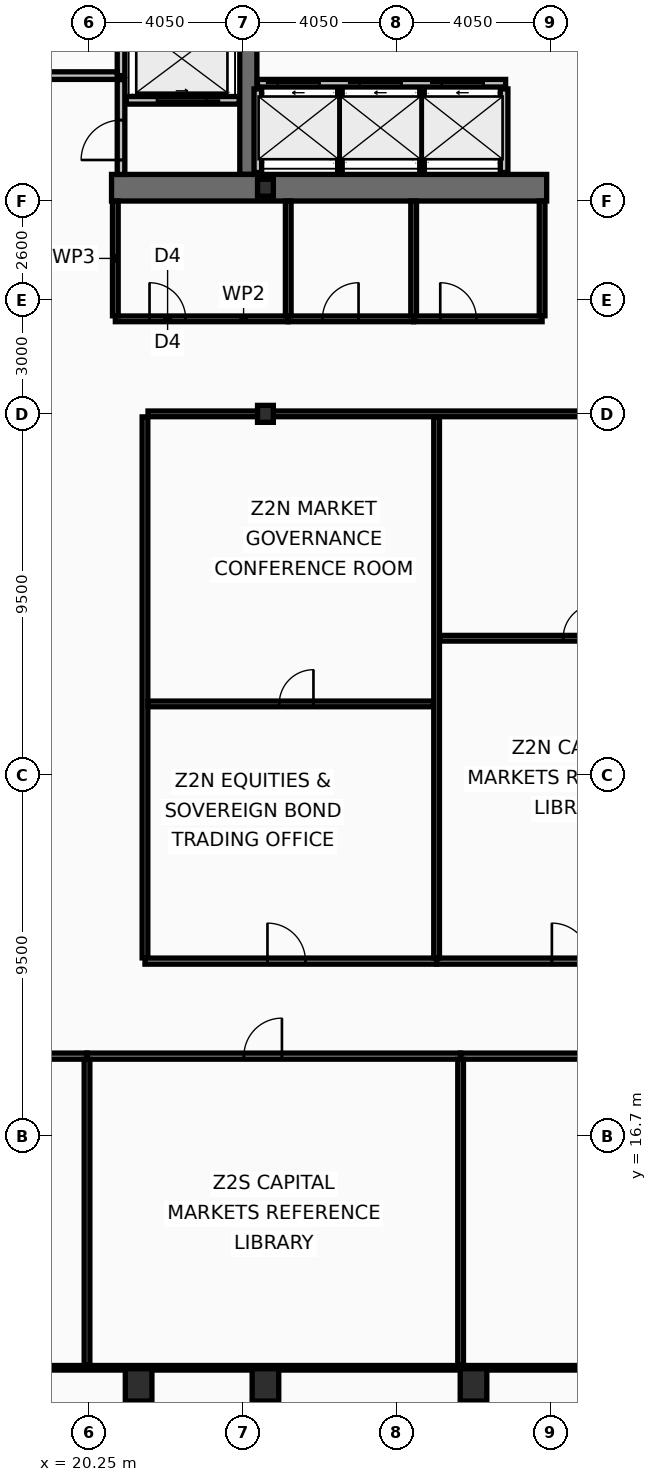
"""IFC4 building model, lengths in metres.
Left out: names, types, materials, properties, quantities, classifications, styles, units other than length and angle.
Written with IfcOpenShell. Run it as: python <this file> out.ifc"""

import sys

from ifc_helpers import new_model, si_unit, direction, frame, frame_2d, origin, origin_2d, place, context, subcontext, project, spatial, rectangle, hollow_rectangle, i_section, extrude, element, fill, save


model = new_model("IFC4")
c1 = context("Model", 3, precision=1e-05, world=origin(), true_north=direction((0.0, 1.0)))
c2 = subcontext(c1, "Body", "Model", "MODEL_VIEW")
j1 = project(units=[si_unit("LENGTHUNIT", "METRE"), si_unit("PLANEANGLEUNIT", "RADIAN")], contexts=[c1])
p1 = place(None, origin())
s1 = spatial("IfcSite", under=j1, at=p1, CompositionType="ELEMENT")
p2 = place(p1, origin())
s2 = spatial("IfcBuilding", under=s1, at=p2, CompositionType="ELEMENT")
p3 = place(p2, frame((0.0, 0.0, 147.0)))
s3 = spatial("IfcBuildingStorey", under=s2, at=p3, CompositionType="ELEMENT", Elevation=147.0)
p4 = place(p3, frame((24.45, 42.0, 0.0), z_axis=(0.0, 0.0, 1.0), x_axis=(0.0, 1.0, 0.0)))
e1 = element("IfcWall", 1, at=p4, inside=s3, PredefinedType="SHEAR", context=c2, shape_type="SweptSolid", body=[
    extrude(rectangle(XDim=11.0, YDim=0.45, at=frame_2d((5.5, 0.0))), origin(), (0.0, 0.0, 1.0), 3.44),
])
p5 = place(p3, frame((32.3, 41.65, 0.0), z_axis=(0.0, 0.0, 1.0), x_axis=(-1.0, 0.0, 0.0)))
e2 = element("IfcWall", 2, at=p5, inside=s3, PredefinedType="SHEAR", context=c2, shape_type="SweptSolid", body=[
    extrude(rectangle(XDim=11.45, YDim=0.7, at=frame_2d((5.725, 0.0))), origin(), (0.0, 0.0, 1.0), 3.44),
])
for number, where, z_axis, x_axis in (
    (3, (21.562, 10.15, 0.0), (0.0, 0.0, 1.0), (1.0, 0.0, 0.0)),
    (4, (24.9, 10.15, 0.0), (0.0, 0.0, 1.0), (1.0, 0.0, 0.0)),
    (5, (30.375, 10.15, 0.0), (0.0, 0.0, 1.0), (1.0, 0.0, 0.0)),
):
    element("IfcColumn", number, at=place(p3, frame(where, z_axis=z_axis, x_axis=x_axis)), inside=s3, PredefinedType="COLUMN", context=c2, shape_type="SweptSolid", body=[
        extrude(hollow_rectangle(XDim=0.7, YDim=0.85, WallThickness=0.05, at=origin_2d()), origin(), (0.0, 0.0, 1.0), 3.6),
    ])
for number, where, z_axis, x_axis in (
    (6, (24.9, 35.7, 0.0), (0.0, 0.0, 1.0), (1.0, 0.0, 0.0)),
    (7, (24.9, 41.65, 0.0), (0.0, 0.0, 1.0), (1.0, 0.0, 0.0)),
):
    element("IfcColumn", number, at=place(p3, frame(where, z_axis=z_axis, x_axis=x_axis)), inside=s3, PredefinedType="COLUMN", context=c2, shape_type="SweptSolid", body=[
        extrude(i_section(OverallWidth=0.416, OverallDepth=0.446, WebThickness=0.039, FlangeThickness=0.063, at=origin_2d()), origin(), (0.0, 0.0, 1.0), 3.6),
    ])
p6 = place(p3, frame((24.69, 44.4, 0.0), z_axis=(0.0, 0.0, 1.0), x_axis=(1.0, 0.0, 0.0)))
e8 = element("IfcWall", 8, at=p6, inside=s3, PredefinedType="PARTITIONING", context=c2, shape_type="SweptSolid", body=[
    extrude(rectangle(XDim=6.53, YDim=0.2, at=frame_2d((3.265, 0.0))), origin(), (0.0, 0.0, 1.0), 3.44),
])
p7 = place(p6, frame((0.53, 0.0, 0.0)))
e9 = element("IfcOpeningElement", 9, at=p7, cuts=e8, PredefinedType="OPENING", context=c2, shape_type="SweptSolid", body=[
    extrude(rectangle(XDim=1.1, YDim=2.18, at=frame_2d((0.55, 1.09))), frame((0.0, 0.11, 0.0), z_axis=(0.0, -1.0, 0.0), x_axis=(1.0, 0.0, 0.0)), (0.0, 0.0, 1.0), 0.22),
])
p8 = place(p6, frame((2.69, 0.0, 0.0)))
e10 = element("IfcOpeningElement", 10, at=p8, cuts=e8, PredefinedType="OPENING", context=c2, shape_type="SweptSolid", body=[
    extrude(rectangle(XDim=1.1, YDim=2.18, at=frame_2d((0.55, 1.09))), frame((0.0, 0.11, 0.0), z_axis=(0.0, -1.0, 0.0), x_axis=(1.0, 0.0, 0.0)), (0.0, 0.0, 1.0), 0.22),
])
p9 = place(p6, frame((4.85, 0.0, 0.0)))
e11 = element("IfcOpeningElement", 11, at=p9, cuts=e8, PredefinedType="OPENING", context=c2, shape_type="SweptSolid", body=[
    extrude(rectangle(XDim=1.1, YDim=2.18, at=frame_2d((0.55, 1.09))), frame((0.0, 0.11, 0.0), z_axis=(0.0, -1.0, 0.0), x_axis=(1.0, 0.0, 0.0)), (0.0, 0.0, 1.0), 0.22),
])
p10 = place(p3, frame((24.21, 43.95, 0.0), z_axis=(0.0, 0.0, 1.0), x_axis=(-1.0, 0.0, 0.0)))
e12 = element("IfcWall", 12, at=p10, inside=s3, PredefinedType="PARTITIONING", context=c2, shape_type="SweptSolid", body=[
    extrude(rectangle(XDim=2.97, YDim=0.2, at=frame_2d((1.485, 0.0))), origin(), (0.0, 0.0, 1.0), 3.44),
])
p11 = place(p10, frame((0.86, 0.0, 0.0)))
e13 = element("IfcOpeningElement", 13, at=p11, cuts=e12, PredefinedType="OPENING", context=c2, shape_type="SweptSolid", body=[
    extrude(rectangle(XDim=1.3, YDim=2.18, at=frame_2d((0.65, 1.09))), frame((0.0, 0.11, 0.0), z_axis=(0.0, -1.0, 0.0), x_axis=(1.0, 0.0, 0.0)), (0.0, 0.0, 1.0), 0.22),
])
p12 = place(p3, frame((21.1, 44.6, 0.0), z_axis=(0.0, 0.0, 1.0), x_axis=(0.0, 1.0, 0.0)))
e14 = element("IfcWall", 14, at=p12, inside=s3, PredefinedType="PARTITIONING", context=c2, shape_type="SweptSolid", body=[
    extrude(rectangle(XDim=4.3, YDim=0.2, at=frame_2d((2.15, 0.0))), origin(), (0.0, 0.0, 1.0), 3.44),
])
p13 = place(p3, frame((16.9, 44.6, 0.0), z_axis=(0.0, 0.0, 1.0), x_axis=(1.0, 0.0, 0.0)))
e15 = element("IfcWall", 15, at=p13, inside=s3, PredefinedType="PARTITIONING", context=c2, shape_type="SweptSolid", body=[
    extrude(rectangle(XDim=4.1, YDim=0.2, at=frame_2d((2.05, 0.0))), origin(), (0.0, 0.0, 1.0), 3.44),
])
p14 = place(p13, frame((1.25, 0.0, 0.0)))
e16 = element("IfcOpeningElement", 16, at=p14, cuts=e15, PredefinedType="OPENING", context=c2, shape_type="SweptSolid", body=[
    extrude(rectangle(XDim=1.05, YDim=2.15, at=frame_2d((0.525, 1.075))), frame((0.0, 0.11, 0.0), z_axis=(0.0, -1.0, 0.0), x_axis=(1.0, 0.0, 0.0)), (0.0, 0.0, 1.0), 0.22),
])
p15 = place(p3, frame((21.1, 42.0, 0.0), z_axis=(0.0, 0.0, 1.0), x_axis=(0.0, 1.0, 0.0)))
e17 = element("IfcWall", 17, at=p15, inside=s3, PredefinedType="PARTITIONING", context=c2, shape_type="SweptSolid", body=[
    extrude(rectangle(XDim=2.495, YDim=0.2, at=frame_2d((1.248, 0.0))), origin(), (0.0, 0.0, 1.0), 3.44),
])
p16 = place(p15, frame((0.38, 0.0, 0.0)))
e18 = element("IfcOpeningElement", 18, at=p16, cuts=e17, PredefinedType="OPENING", context=c2, shape_type="SweptSolid", body=[
    extrude(rectangle(XDim=1.05, YDim=2.15, at=frame_2d((0.525, 1.075))), frame((0.0, 0.11, 0.0), z_axis=(0.0, -1.0, 0.0), x_axis=(1.0, 0.0, 0.0)), (0.0, 0.0, 1.0), 0.22),
])
for number, where, z_axis, x_axis in (
    (19, (24.7, 42.05, 0.0), (0.0, 0.0, 1.0), (0.0, 1.0, 0.0)),
    (20, (31.18, 42.05, 0.0), (0.0, 0.0, 1.0), (0.0, 1.0, 0.0)),
):
    element("IfcWall", number, at=place(p3, frame(where, z_axis=z_axis, x_axis=x_axis)), inside=s3, PredefinedType="PARTITIONING", context=c2, shape_type="SweptSolid", body=[
        extrude(rectangle(XDim=2.2, YDim=0.2, at=frame_2d((1.1, 0.0))), origin(), (0.0, 0.0, 1.0), 3.44),
    ])
for number, where, z_axis, x_axis in (
    (21, (26.86, 42.05, 0.0), (0.0, 0.0, 1.0), (0.0, 1.0, 0.0)),
    (22, (29.02, 42.05, 0.0), (0.0, 0.0, 1.0), (0.0, 1.0, 0.0)),
):
    element("IfcWall", number, at=place(p3, frame(where, z_axis=z_axis, x_axis=x_axis)), inside=s3, PredefinedType="PARTITIONING", context=c2, shape_type="SweptSolid", body=[
        extrude(rectangle(XDim=2.2, YDim=0.12, at=frame_2d((1.1, 0.0))), origin(), (0.0, 0.0, 1.0), 3.44),
    ])
p17 = place(p3, frame((20.95, 38.2, 0.0), z_axis=(0.0, 0.0, 1.0), x_axis=(1.0, 0.0, 0.0)))
e23 = element("IfcWall", 23, at=p17, inside=s3, PredefinedType="PARTITIONING", context=c2, shape_type="SweptSolid", body=[
    extrude(rectangle(XDim=4.55, YDim=0.15, at=frame_2d((2.275, 0.0))), origin(), (0.0, 0.0, 1.0), 2.73),
])
p18 = place(p17, frame((0.9, 0.0, 0.0)))
e24 = element("IfcOpeningElement", 24, at=p18, cuts=e23, PredefinedType="OPENING", context=c2, shape_type="SweptSolid", body=[
    extrude(rectangle(XDim=0.95, YDim=2.05, at=frame_2d((0.475, 1.025))), frame((0.0, 0.085, 0.0), z_axis=(0.0, -1.0, 0.0), x_axis=(1.0, 0.0, 0.0)), (0.0, 0.0, 1.0), 0.17),
])
p19 = place(p3, frame((25.5, 38.2, 0.0), z_axis=(0.0, 0.0, 1.0), x_axis=(1.0, 0.0, 0.0)))
e25 = element("IfcWall", 25, at=p19, inside=s3, PredefinedType="PARTITIONING", context=c2, shape_type="SweptSolid", body=[
    extrude(rectangle(XDim=3.3, YDim=0.15, at=frame_2d((1.65, 0.0))), origin(), (0.0, 0.0, 1.0), 3.44),
])
p20 = place(p19, frame((0.9, 0.0, 0.0)))
e26 = element("IfcOpeningElement", 26, at=p20, cuts=e25, PredefinedType="OPENING", context=c2, shape_type="SweptSolid", body=[
    extrude(rectangle(XDim=0.95, YDim=2.05, at=frame_2d((0.475, 1.025))), frame((0.0, 0.085, 0.0), z_axis=(0.0, -1.0, 0.0), x_axis=(1.0, 0.0, 0.0)), (0.0, 0.0, 1.0), 0.17),
])
p21 = place(p3, frame((28.8, 38.2, 0.0), z_axis=(0.0, 0.0, 1.0), x_axis=(1.0, 0.0, 0.0)))
e27 = element("IfcWall", 27, at=p21, inside=s3, PredefinedType="PARTITIONING", context=c2, shape_type="SweptSolid", body=[
    extrude(rectangle(XDim=3.38, YDim=0.15, at=frame_2d((1.69, 0.0))), origin(), (0.0, 0.0, 1.0), 2.73),
])
p22 = place(p21, frame((0.7, 0.0, 0.0)))
e28 = element("IfcOpeningElement", 28, at=p22, cuts=e27, PredefinedType="OPENING", context=c2, shape_type="SweptSolid", body=[
    extrude(rectangle(XDim=0.95, YDim=2.05, at=frame_2d((0.475, 1.025))), frame((0.0, 0.085, 0.0), z_axis=(0.0, -1.0, 0.0), x_axis=(1.0, 0.0, 0.0)), (0.0, 0.0, 1.0), 0.17),
])
for number, where, z_axis, x_axis in (
    (29, (20.95, 38.28, 0.0), (0.0, 0.0, 1.0), (0.0, 1.0, 0.0)),
    (30, (25.5, 38.28, 0.0), (0.0, 0.0, 1.0), (0.0, 1.0, 0.0)),
    (31, (28.8, 38.28, 0.0), (0.0, 0.0, 1.0), (0.0, 1.0, 0.0)),
    (32, (32.18, 38.28, 0.0), (0.0, 0.0, 1.0), (0.0, 1.0, 0.0)),
):
    element("IfcWall", number, at=place(p3, frame(where, z_axis=z_axis, x_axis=x_axis)), inside=s3, PredefinedType="PARTITIONING", context=c2, shape_type="SweptSolid", body=[
        extrude(rectangle(XDim=3.02, YDim=0.15, at=frame_2d((1.51, 0.0))), origin(), (0.0, 0.0, 1.0), 3.44),
    ])
p23 = place(p3, frame((6.03, 18.8, 0.0), z_axis=(0.0, 0.0, 1.0), x_axis=(1.0, 0.0, 0.0)))
e33 = element("IfcWall", 33, at=p23, inside=s3, PredefinedType="PARTITIONING", context=c2, shape_type="SweptSolid", body=[
    extrude(rectangle(XDim=14.175, YDim=0.16, at=frame_2d((7.087, 0.0))), origin(), (0.0, 0.0, 1.0), 2.73),
])
p24 = place(p23, frame((5.953, 0.0, 0.0)))
e34 = element("IfcOpeningElement", 34, at=p24, cuts=e33, PredefinedType="OPENING", context=c2, shape_type="SweptSolid", body=[
    extrude(rectangle(XDim=1.6, YDim=2.15, at=frame_2d((0.8, 1.075))), frame((0.0, 0.09, 0.0), z_axis=(0.0, -1.0, 0.0), x_axis=(1.0, 0.0, 0.0)), (0.0, 0.0, 1.0), 0.18),
])
p25 = place(p3, frame((20.205, 18.8, 0.0), z_axis=(0.0, 0.0, 1.0), x_axis=(1.0, 0.0, 0.0)))
e35 = element("IfcWall", 35, at=p25, inside=s3, PredefinedType="PARTITIONING", context=c2, shape_type="SweptSolid", body=[
    extrude(rectangle(XDim=9.831, YDim=0.16, at=frame_2d((4.916, 0.0))), origin(), (0.0, 0.0, 1.0), 2.73),
])
p26 = place(p25, frame((4.129, 0.0, 0.0)))
e36 = element("IfcOpeningElement", 36, at=p26, cuts=e35, PredefinedType="OPENING", context=c2, shape_type="SweptSolid", body=[
    extrude(rectangle(XDim=1.0, YDim=2.05, at=frame_2d((0.5, 1.025))), frame((0.0, 0.09, 0.0), z_axis=(0.0, -1.0, 0.0), x_axis=(1.0, 0.0, 0.0)), (0.0, 0.0, 1.0), 0.18),
])
p27 = place(p3, frame((20.205, 10.665, 0.0), z_axis=(0.0, 0.0, 1.0), x_axis=(0.0, 1.0, 0.0)))
e37 = element("IfcWall", 37, at=p27, inside=s3, PredefinedType="PARTITIONING", context=c2, shape_type="SweptSolid", body=[
    extrude(rectangle(XDim=8.05, YDim=0.15, at=frame_2d((4.025, 0.0))), origin(), (0.0, 0.0, 1.0), 2.93),
])
p28 = place(p3, frame((30.036, 18.8, 0.0), z_axis=(0.0, 0.0, 1.0), x_axis=(1.0, 0.0, 0.0)))
e38 = element("IfcWall", 38, at=p28, inside=s3, PredefinedType="PARTITIONING", context=c2, shape_type="SweptSolid", body=[
    extrude(rectangle(XDim=10.796, YDim=0.16, at=frame_2d((5.398, 0.0))), origin(), (0.0, 0.0, 1.0), 2.73),
])
p29 = place(p28, frame((4.534, 0.0, 0.0)))
e39 = element("IfcOpeningElement", 39, at=p29, cuts=e38, PredefinedType="OPENING", context=c2, shape_type="SweptSolid", body=[
    extrude(rectangle(XDim=1.0, YDim=2.05, at=frame_2d((0.5, 1.025))), frame((0.0, 0.09, 0.0), z_axis=(0.0, -1.0, 0.0), x_axis=(1.0, 0.0, 0.0)), (0.0, 0.0, 1.0), 0.18),
])
p30 = place(p3, frame((30.036, 10.665, 0.0), z_axis=(0.0, 0.0, 1.0), x_axis=(0.0, 1.0, 0.0)))
e40 = element("IfcWall", 40, at=p30, inside=s3, PredefinedType="PARTITIONING", context=c2, shape_type="SweptSolid", body=[
    extrude(rectangle(XDim=8.05, YDim=0.15, at=frame_2d((4.025, 0.0))), origin(), (0.0, 0.0, 1.0), 2.73),
])
p31 = place(p3, frame((21.73, 21.385, 0.0), z_axis=(0.0, 0.0, 1.0), x_axis=(0.0, 1.0, 0.0)))
e41 = element("IfcWall", 41, at=p31, inside=s3, PredefinedType="PARTITIONING", context=c2, shape_type="SweptSolid", body=[
    extrude(rectangle(XDim=14.235, YDim=0.15, at=frame_2d((7.118, 0.0))), origin(), (0.0, 0.0, 1.0), 2.93),
])
p32 = place(p3, frame((21.81, 35.7, 0.0), z_axis=(0.0, 0.0, 1.0), x_axis=(1.0, 0.0, 0.0)))
e42 = element("IfcWall", 42, at=p32, inside=s3, PredefinedType="PARTITIONING", context=c2, shape_type="SweptSolid", body=[
    extrude(rectangle(XDim=44.995, YDim=0.15, at=frame_2d((22.498, 0.0))), origin(), (0.0, 0.0, 1.0), 2.73),
])
p33 = place(p3, frame((21.73, 21.3, 0.0), z_axis=(0.0, 0.0, 1.0), x_axis=(1.0, 0.0, 0.0)))
e43 = element("IfcWall", 43, at=p33, inside=s3, PredefinedType="PARTITIONING", context=c2, shape_type="SweptSolid", body=[
    extrude(rectangle(XDim=7.674, YDim=0.16, at=frame_2d((3.837, 0.0))), origin(), (0.0, 0.0, 1.0), 2.73),
])
p34 = place(p33, frame((3.223, 0.0, 0.0)))
e44 = element("IfcOpeningElement", 44, at=p34, cuts=e43, PredefinedType="OPENING", context=c2, shape_type="SweptSolid", body=[
    extrude(rectangle(XDim=1.0, YDim=2.05, at=frame_2d((0.5, 1.025))), frame((0.0, 0.09, 0.0), z_axis=(0.0, -1.0, 0.0), x_axis=(1.0, 0.0, 0.0)), (0.0, 0.0, 1.0), 0.18),
])
p35 = place(p3, frame((21.81, 28.068, 0.0), z_axis=(0.0, 0.0, 1.0), x_axis=(1.0, 0.0, 0.0)))
e45 = element("IfcWall", 45, at=p35, inside=s3, PredefinedType="PARTITIONING", context=c2, shape_type="SweptSolid", body=[
    extrude(rectangle(XDim=7.514, YDim=0.15, at=frame_2d((3.757, 0.0))), origin(), (0.0, 0.0, 1.0), 2.73),
])
p36 = place(p35, frame((3.453, 0.0, 0.0)))
e46 = element("IfcOpeningElement", 46, at=p36, cuts=e45, PredefinedType="OPENING", context=c2, shape_type="SweptSolid", body=[
    extrude(rectangle(XDim=0.9, YDim=2.05, at=frame_2d((0.45, 1.025))), frame((0.0, 0.085, 0.0), z_axis=(0.0, -1.0, 0.0), x_axis=(1.0, 0.0, 0.0)), (0.0, 0.0, 1.0), 0.17),
])
p37 = place(p3, frame((29.404, 21.3, 0.0), z_axis=(0.0, 0.0, 1.0), x_axis=(1.0, 0.0, 0.0)))
e47 = element("IfcWall", 47, at=p37, inside=s3, PredefinedType="PARTITIONING", context=c2, shape_type="SweptSolid", body=[
    extrude(rectangle(XDim=7.222, YDim=0.16, at=frame_2d((3.611, 0.0))), origin(), (0.0, 0.0, 1.0), 2.73),
])
p38 = place(p37, frame((3.033, 0.0, 0.0)))
e48 = element("IfcOpeningElement", 48, at=p38, cuts=e47, PredefinedType="OPENING", context=c2, shape_type="SweptSolid", body=[
    extrude(rectangle(XDim=1.0, YDim=2.05, at=frame_2d((0.5, 1.025))), frame((0.0, 0.09, 0.0), z_axis=(0.0, -1.0, 0.0), x_axis=(1.0, 0.0, 0.0)), (0.0, 0.0, 1.0), 0.18),
])
p39 = place(p3, frame((29.404, 21.385, 0.0), z_axis=(0.0, 0.0, 1.0), x_axis=(0.0, 1.0, 0.0)))
e49 = element("IfcWall", 49, at=p39, inside=s3, PredefinedType="PARTITIONING", context=c2, shape_type="SweptSolid", body=[
    extrude(rectangle(XDim=14.235, YDim=0.15, at=frame_2d((7.118, 0.0))), origin(), (0.0, 0.0, 1.0), 2.93),
])
p40 = place(p3, frame((29.484, 29.796, 0.0), z_axis=(0.0, 0.0, 1.0), x_axis=(1.0, 0.0, 0.0)))
e50 = element("IfcWall", 50, at=p40, inside=s3, PredefinedType="PARTITIONING", context=c2, shape_type="SweptSolid", body=[
    extrude(rectangle(XDim=7.062, YDim=0.15, at=frame_2d((3.531, 0.0))), origin(), (0.0, 0.0, 1.0), 2.73),
])
p41 = place(p40, frame((3.25, 0.0, 0.0)))
e51 = element("IfcOpeningElement", 51, at=p41, cuts=e50, PredefinedType="OPENING", context=c2, shape_type="SweptSolid", body=[
    extrude(rectangle(XDim=0.9, YDim=2.05, at=frame_2d((0.45, 1.025))), frame((0.0, 0.085, 0.0), z_axis=(0.0, -1.0, 0.0), x_axis=(1.0, 0.0, 0.0)), (0.0, 0.0, 1.0), 0.17),
])
p42 = place(p3, frame((6.095, 10.6, 0.0), z_axis=(0.0, 0.0, 1.0), x_axis=(1.0, 0.0, 0.0)))
e52 = element("IfcWall", 52, at=p42, inside=s3, PredefinedType="PARTITIONING", context=c2, shape_type="SweptSolid", body=[
    extrude(rectangle(XDim=60.71, YDim=0.12, at=frame_2d((30.355, 0.0))), origin(), (0.0, 0.0, 1.0), 2.73),
])
p43 = place(p7, origin())
e53 = element("IfcDoor", 53, at=p43, inside=s3, OperationType="SLIDING_TO_LEFT", PredefinedType="DOOR", context=c2, shape_type="SweptSolid", body=[
    extrude(rectangle(XDim=1.1, YDim=2.18, at=frame_2d((0.55, 1.09))), frame((0.0, 0.025, 0.0), z_axis=(0.0, -1.0, 0.0), x_axis=(1.0, 0.0, 0.0)), (0.0, 0.0, 1.0), 0.05),
])
fill(e9, e53)
p44 = place(p8, origin())
e54 = element("IfcDoor", 54, at=p44, inside=s3, OperationType="SLIDING_TO_LEFT", PredefinedType="DOOR", context=c2, shape_type="SweptSolid", body=[
    extrude(rectangle(XDim=1.1, YDim=2.18, at=frame_2d((0.55, 1.09))), frame((0.0, 0.025, 0.0), z_axis=(0.0, -1.0, 0.0), x_axis=(1.0, 0.0, 0.0)), (0.0, 0.0, 1.0), 0.05),
])
fill(e10, e54)
p45 = place(p9, origin())
e55 = element("IfcDoor", 55, at=p45, inside=s3, OperationType="SLIDING_TO_LEFT", PredefinedType="DOOR", context=c2, shape_type="SweptSolid", body=[
    extrude(rectangle(XDim=1.1, YDim=2.18, at=frame_2d((0.55, 1.09))), frame((0.0, 0.025, 0.0), z_axis=(0.0, -1.0, 0.0), x_axis=(1.0, 0.0, 0.0)), (0.0, 0.0, 1.0), 0.05),
])
fill(e11, e55)
p46 = place(p11, origin())
e56 = element("IfcDoor", 56, at=p46, inside=s3, OperationType="SLIDING_TO_LEFT", PredefinedType="DOOR", context=c2, shape_type="SweptSolid", body=[
    extrude(rectangle(XDim=1.3, YDim=2.18, at=frame_2d((0.65, 1.09))), frame((0.0, 0.025, 0.0), z_axis=(0.0, -1.0, 0.0), x_axis=(1.0, 0.0, 0.0)), (0.0, 0.0, 1.0), 0.05),
])
fill(e13, e56)
p47 = place(p16, origin())
e57 = element("IfcDoor", 57, at=p47, inside=s3, OperationType="SINGLE_SWING_LEFT", PredefinedType="DOOR", context=c2, shape_type="SweptSolid", body=[
    extrude(rectangle(XDim=1.05, YDim=2.15, at=frame_2d((0.525, 1.075))), frame((0.0, 0.025, 0.0), z_axis=(0.0, -1.0, 0.0), x_axis=(1.0, 0.0, 0.0)), (0.0, 0.0, 1.0), 0.05),
])
fill(e18, e57)
p48 = place(p18, origin())
e58 = element("IfcDoor", 58, at=p48, inside=s3, OperationType="SINGLE_SWING_LEFT", PredefinedType="DOOR", context=c2, shape_type="SweptSolid", body=[
    extrude(rectangle(XDim=0.95, YDim=2.05, at=frame_2d((0.475, 1.025))), frame((0.0, 0.025, 0.0), z_axis=(0.0, -1.0, 0.0), x_axis=(1.0, 0.0, 0.0)), (0.0, 0.0, 1.0), 0.05),
])
fill(e24, e58)
p49 = place(p20, origin())
e59 = element("IfcDoor", 59, at=p49, inside=s3, OperationType="SINGLE_SWING_RIGHT", PredefinedType="DOOR", context=c2, shape_type="SweptSolid", body=[
    extrude(rectangle(XDim=0.95, YDim=2.05, at=frame_2d((0.475, 1.025))), frame((0.0, 0.025, 0.0), z_axis=(0.0, -1.0, 0.0), x_axis=(1.0, 0.0, 0.0)), (0.0, 0.0, 1.0), 0.05),
])
fill(e26, e59)
p50 = place(p22, origin())
e60 = element("IfcDoor", 60, at=p50, inside=s3, OperationType="SINGLE_SWING_LEFT", PredefinedType="DOOR", context=c2, shape_type="SweptSolid", body=[
    extrude(rectangle(XDim=0.95, YDim=2.05, at=frame_2d((0.475, 1.025))), frame((0.0, 0.025, 0.0), z_axis=(0.0, -1.0, 0.0), x_axis=(1.0, 0.0, 0.0)), (0.0, 0.0, 1.0), 0.05),
])
fill(e28, e60)
p51 = place(p26, origin())
e61 = element("IfcDoor", 61, at=p51, inside=s3, OperationType="SINGLE_SWING_RIGHT", PredefinedType="DOOR", context=c2, shape_type="SweptSolid", body=[
    extrude(rectangle(XDim=1.0, YDim=2.05, at=frame_2d((0.5, 1.025))), frame((0.0, 0.025, 0.0), z_axis=(0.0, -1.0, 0.0), x_axis=(1.0, 0.0, 0.0)), (0.0, 0.0, 1.0), 0.05),
])
fill(e36, e61)
p52 = place(p34, origin())
e62 = element("IfcDoor", 62, at=p52, inside=s3, OperationType="SINGLE_SWING_LEFT", PredefinedType="DOOR", context=c2, shape_type="SweptSolid", body=[
    extrude(rectangle(XDim=1.0, YDim=2.05, at=frame_2d((0.5, 1.025))), frame((0.0, 0.025, 0.0), z_axis=(0.0, -1.0, 0.0), x_axis=(1.0, 0.0, 0.0)), (0.0, 0.0, 1.0), 0.05),
])
fill(e44, e62)
p53 = place(p36, origin())
e63 = element("IfcDoor", 63, at=p53, inside=s3, OperationType="SINGLE_SWING_RIGHT", PredefinedType="DOOR", context=c2, shape_type="SweptSolid", body=[
    extrude(rectangle(XDim=0.9, YDim=2.05, at=frame_2d((0.45, 1.025))), frame((0.0, 0.025, 0.0), z_axis=(0.0, -1.0, 0.0), x_axis=(1.0, 0.0, 0.0)), (0.0, 0.0, 1.0), 0.05),
])
fill(e46, e63)
p54 = place(p38, origin())
e64 = element("IfcDoor", 64, at=p54, inside=s3, OperationType="SINGLE_SWING_LEFT", PredefinedType="DOOR", context=c2, shape_type="SweptSolid", body=[
    extrude(rectangle(XDim=1.0, YDim=2.05, at=frame_2d((0.5, 1.025))), frame((0.0, 0.025, 0.0), z_axis=(0.0, -1.0, 0.0), x_axis=(1.0, 0.0, 0.0)), (0.0, 0.0, 1.0), 0.05),
])
fill(e48, e64)
p55 = place(p41, origin())
e65 = element("IfcDoor", 65, at=p55, inside=s3, OperationType="SINGLE_SWING_RIGHT", PredefinedType="DOOR", context=c2, shape_type="SweptSolid", body=[
    extrude(rectangle(XDim=0.9, YDim=2.05, at=frame_2d((0.45, 1.025))), frame((0.0, 0.025, 0.0), z_axis=(0.0, -1.0, 0.0), x_axis=(1.0, 0.0, 0.0)), (0.0, 0.0, 1.0), 0.05),
])
fill(e51, e65)
save(model, sys.argv[1])
